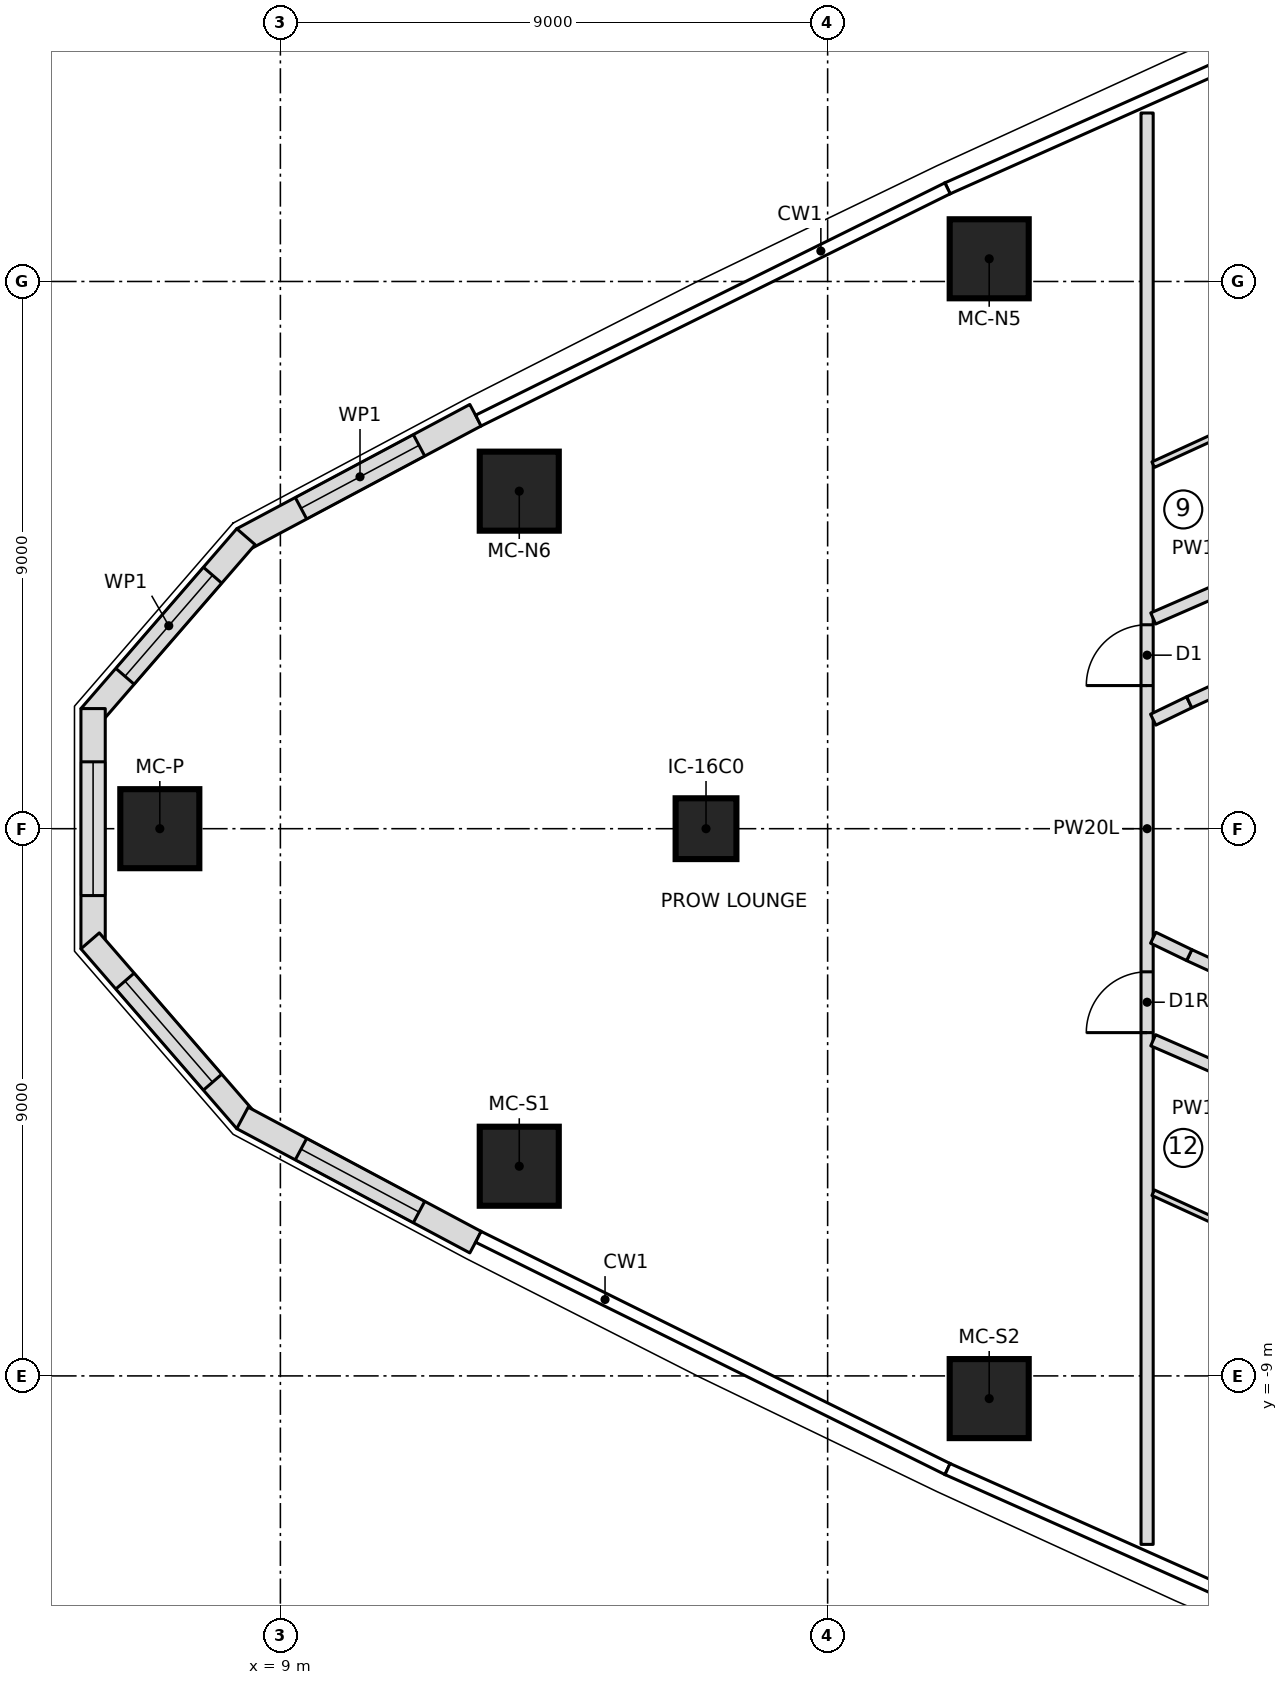
"""IFC4 building model, lengths in metres.
Left out: names, types, materials, properties, quantities, classifications, styles, units other than length and angle.
Written with IfcOpenShell. Run it as: python <this file> out.ifc"""

import sys

from ifc_helpers import new_model, si_unit, direction, frame, frame_2d, origin, origin_2d, place, context, subcontext, project, spatial, polyline, rectangle, outline, extrude, element, fill, save


model = new_model("IFC4")
c1 = context("Model", 3, precision=1e-05, world=origin(), true_north=direction((0.0, 1.0)))
c2 = subcontext(c1, "Body", "Model", "MODEL_VIEW")
j1 = project(units=[si_unit("LENGTHUNIT", "METRE"), si_unit("PLANEANGLEUNIT", "RADIAN")], contexts=[c1])
p1 = place(None, origin())
s1 = spatial("IfcSite", under=j1, at=p1, CompositionType="ELEMENT")
p2 = place(p1, origin())
s2 = spatial("IfcBuilding", under=s1, at=p2, CompositionType="ELEMENT")
p3 = place(p2, frame((0.0, 0.0, 186.15)))
s3 = spatial("IfcBuildingStorey", under=s2, at=p3, CompositionType="ELEMENT", Elevation=186.15)
for number, where, z_axis, x_axis in (
    (1, (7.017, 0.0, 0.0), (0.0, 0.0, 1.0), (1.0, 0.0, 0.0)),
    (2, (12.929, -5.552, 0.0), (0.0, 0.0, 1.0), (1.0, 0.0, 0.0)),
    (3, (20.657, -9.373, 0.0), (0.0, 0.0, 1.0), (1.0, 0.0, 0.0)),
    (4, (20.657, 9.373, 0.0), (0.0, 0.0, 1.0), (1.0, 0.0, 0.0)),
    (5, (12.929, 5.552, 0.0), (0.0, 0.0, 1.0), (1.0, 0.0, 0.0)),
):
    element("IfcColumn", number, at=place(p3, frame(where, z_axis=z_axis, x_axis=x_axis)), inside=s3, PredefinedType="COLUMN", context=c2, shape_type="SweptSolid", body=[
        extrude(rectangle(XDim=1.3, YDim=1.3, at=origin_2d()), origin(), (0.0, 0.0, 1.0), 3.55),
    ])
p4 = place(p3, frame((16.0, 0.0, 0.0), z_axis=(0.0, 0.0, 1.0), x_axis=(1.0, 0.0, 0.0)))
e6 = element("IfcColumn", 6, at=p4, inside=s3, PredefinedType="COLUMN", context=c2, shape_type="SweptSolid", body=[
    extrude(rectangle(XDim=1.0, YDim=1.0, at=origin_2d()), origin(), (0.0, 0.0, 1.0), 3.55),
])
p5 = place(p3, frame((12.21, 6.801, 0.0), z_axis=(0.0, 0.0, 1.0), x_axis=(-0.882385889746, -0.470526451518, 0.0)))
e7 = element("IfcWall", 7, at=p5, inside=s3, PredefinedType="NOTDEFINED", context=c2, shape_type="SweptSolid", body=[
    extrude(outline(polyline([(0.0, -0.2), (4.344, -0.2), (4.27, 0.2), (0.0, 0.2), (0.0, -0.2)])), origin(), (0.0, 0.0, 1.0), 3.25),
])
p6 = place(p5, frame((1.053, 0.0, 0.6)))
e8 = element("IfcOpeningElement", 8, at=p6, cuts=e7, PredefinedType="OPENING", context=c2, shape_type="SweptSolid", body=[
    extrude(outline(polyline([(0.0, 1.35), (0.084, 1.771), (0.322, 2.128), (0.679, 2.366), (1.1, 2.45), (1.521, 2.366), (1.878, 2.128), (2.116, 1.771), (2.2, 1.35), (2.2, 1.1), (2.116, 0.679), (1.878, 0.322), (1.521, 0.084), (1.1, 0.0), (0.679, 0.084), (0.322, 0.322), (0.084, 0.679), (0.0, 1.1), (0.0, 1.35)])), frame((0.0, 0.21, 0.0), z_axis=(0.0, -1.0, 0.0), x_axis=(1.0, 0.0, 0.0)), (0.0, 0.0, 1.0), 0.42),
])
p7 = place(p3, frame((8.409, 4.774, 0.0), z_axis=(0.0, 0.0, 1.0), x_axis=(-0.654759384203, -0.755837382509, 0.0)))
e9 = element("IfcWall", 9, at=p7, inside=s3, PredefinedType="NOTDEFINED", context=c2, shape_type="SweptSolid", body=[
    extrude(outline(polyline([(-0.037, -0.2), (3.876, -0.2), (3.727, 0.2), (0.037, 0.2), (-0.037, -0.2)])), origin(), (0.0, 0.0, 1.0), 3.25),
])
p8 = place(p7, frame((0.801, 0.0, 0.6)))
e10 = element("IfcOpeningElement", 10, at=p8, cuts=e9, PredefinedType="OPENING", context=c2, shape_type="SweptSolid", body=[
    extrude(outline(polyline([(0.0, 1.35), (0.084, 1.771), (0.322, 2.128), (0.679, 2.366), (1.1, 2.45), (1.521, 2.366), (1.878, 2.128), (2.116, 1.771), (2.2, 1.35), (2.2, 1.1), (2.116, 0.679), (1.878, 0.322), (1.521, 0.084), (1.1, 0.0), (0.679, 0.084), (0.322, 0.322), (0.084, 0.679), (0.0, 1.1), (0.0, 1.35)])), frame((0.0, 0.21, 0.0), z_axis=(0.0, -1.0, 0.0), x_axis=(1.0, 0.0, 0.0)), (0.0, 0.0, 1.0), 0.42),
])
p9 = place(p3, frame((5.92, 1.901, 0.0), z_axis=(0.0, 0.0, 1.0), x_axis=(0.0, -1.0, 0.0)))
e11 = element("IfcWall", 11, at=p9, inside=s3, PredefinedType="NOTDEFINED", context=c2, shape_type="SweptSolid", body=[
    extrude(outline(polyline([(-0.075, -0.2), (3.876, -0.2), (3.727, 0.2), (0.075, 0.2), (-0.075, -0.2)])), origin(), (0.0, 0.0, 1.0), 3.25),
])
p10 = place(p9, frame((0.801, 0.0, 0.6)))
e12 = element("IfcOpeningElement", 12, at=p10, cuts=e11, PredefinedType="OPENING", context=c2, shape_type="SweptSolid", body=[
    extrude(outline(polyline([(0.0, 1.35), (0.084, 1.771), (0.322, 2.128), (0.679, 2.366), (1.1, 2.45), (1.521, 2.366), (1.878, 2.128), (2.116, 1.771), (2.2, 1.35), (2.2, 1.1), (2.116, 0.679), (1.878, 0.322), (1.521, 0.084), (1.1, 0.0), (0.679, 0.084), (0.322, 0.322), (0.084, 0.679), (0.0, 1.1), (0.0, 1.35)])), frame((0.0, 0.21, 0.0), z_axis=(0.0, -1.0, 0.0), x_axis=(1.0, 0.0, 0.0)), (0.0, 0.0, 1.0), 0.42),
])
p11 = place(p3, frame((5.92, -1.901, 0.0), z_axis=(0.0, 0.0, 1.0), x_axis=(0.654759384203, -0.755837382509, 0.0)))
e13 = element("IfcWall", 13, at=p11, inside=s3, PredefinedType="NOTDEFINED", context=c2, shape_type="SweptSolid", body=[
    extrude(outline(polyline([(-0.075, -0.2), (3.839, -0.2), (3.765, 0.2), (0.075, 0.2), (-0.075, -0.2)])), origin(), (0.0, 0.0, 1.0), 3.25),
])
p12 = place(p11, frame((0.801, 0.0, 0.6)))
e14 = element("IfcOpeningElement", 14, at=p12, cuts=e13, PredefinedType="OPENING", context=c2, shape_type="SweptSolid", body=[
    extrude(outline(polyline([(0.0, 1.35), (0.084, 1.771), (0.322, 2.128), (0.679, 2.366), (1.1, 2.45), (1.521, 2.366), (1.878, 2.128), (2.116, 1.771), (2.2, 1.35), (2.2, 1.1), (2.116, 0.679), (1.878, 0.322), (1.521, 0.084), (1.1, 0.0), (0.679, 0.084), (0.322, 0.322), (0.084, 0.679), (0.0, 1.1), (0.0, 1.35)])), frame((0.0, 0.21, 0.0), z_axis=(0.0, -1.0, 0.0), x_axis=(1.0, 0.0, 0.0)), (0.0, 0.0, 1.0), 0.42),
])
p13 = place(p3, frame((8.409, -4.774, 0.0), z_axis=(0.0, 0.0, 1.0), x_axis=(0.882385889746, -0.470526451518, 0.0)))
e15 = element("IfcWall", 15, at=p13, inside=s3, PredefinedType="NOTDEFINED", context=c2, shape_type="SweptSolid", body=[
    extrude(outline(polyline([(-0.037, -0.2), (4.307, -0.2), (4.307, 0.2), (0.037, 0.2), (-0.037, -0.2)])), origin(), (0.0, 0.0, 1.0), 3.25),
])
p14 = place(p13, frame((1.053, 0.0, 0.6)))
e16 = element("IfcOpeningElement", 16, at=p14, cuts=e15, PredefinedType="OPENING", context=c2, shape_type="SweptSolid", body=[
    extrude(outline(polyline([(0.0, 1.35), (0.084, 1.771), (0.322, 2.128), (0.679, 2.366), (1.1, 2.45), (1.521, 2.366), (1.878, 2.128), (2.116, 1.771), (2.2, 1.35), (2.2, 1.1), (2.116, 0.679), (1.878, 0.322), (1.521, 0.084), (1.1, 0.0), (0.679, 0.084), (0.322, 0.322), (0.084, 0.679), (0.0, 1.1), (0.0, 1.35)])), frame((0.0, 0.21, 0.0), z_axis=(0.0, -1.0, 0.0), x_axis=(1.0, 0.0, 0.0)), (0.0, 0.0, 1.0), 0.42),
])
p15 = place(p3, frame((23.254, -11.771, 0.0), z_axis=(0.0, 0.0, 1.0), x_axis=(0.0, 1.0, 0.0)))
e17 = element("IfcWall", 17, at=p15, inside=s3, PredefinedType="PARTITIONING", context=c2, shape_type="SweptSolid", body=[
    extrude(rectangle(XDim=23.542, YDim=0.2, at=frame_2d((11.771, 0.0))), origin(), (0.0, 0.0, 1.0), 3.25),
])
p16 = place(p15, frame((14.125, 0.0, 0.0)))
e18 = element("IfcOpeningElement", 18, at=p16, cuts=e17, PredefinedType="OPENING", context=c2, shape_type="SweptSolid", body=[
    extrude(rectangle(XDim=1.0, YDim=2.1, at=frame_2d((0.5, 1.05))), frame((0.0, 0.11, 0.0), z_axis=(0.0, -1.0, 0.0), x_axis=(1.0, 0.0, 0.0)), (0.0, 0.0, 1.0), 0.22),
])
p17 = place(p15, frame((8.417, 0.0, 0.0)))
e19 = element("IfcOpeningElement", 19, at=p17, cuts=e17, PredefinedType="OPENING", context=c2, shape_type="SweptSolid", body=[
    extrude(rectangle(XDim=1.0, YDim=2.1, at=frame_2d((0.5, 1.05))), frame((0.0, 0.11, 0.0), z_axis=(0.0, -1.0, 0.0), x_axis=(1.0, 0.0, 0.0)), (0.0, 0.0, 1.0), 0.22),
])
p18 = place(p3, frame((23.354, 3.458, 0.0), z_axis=(0.0, 0.0, 1.0), x_axis=(0.916719487908, 0.399531451189, 0.0)))
e20 = element("IfcWall", 20, at=p18, inside=s3, PredefinedType="PARTITIONING", context=c2, shape_type="SweptSolid", body=[
    extrude(rectangle(XDim=11.404, YDim=0.2, at=frame_2d((5.702, 0.0))), origin(), (0.0, 0.0, 1.0), 3.25),
])
p19 = place(p18, frame((3.05, 0.0, 0.0)))
e21 = element("IfcOpeningElement", 21, at=p19, cuts=e20, PredefinedType="OPENING", context=c2, shape_type="SweptSolid", body=[
    extrude(rectangle(XDim=1.0, YDim=2.1, at=frame_2d((0.5, 1.05))), frame((0.0, 0.11, 0.0), z_axis=(0.0, -1.0, 0.0), x_axis=(1.0, 0.0, 0.0)), (0.0, 0.0, 1.0), 0.22),
])
p20 = place(p3, frame((23.354, 5.987, 0.0), z_axis=(0.0, 0.0, 1.0), x_axis=(0.909158902999, 0.416449383597, 0.0)))
e22 = element("IfcWall", 22, at=p20, inside=s3, PredefinedType="PARTITIONING", context=c2, shape_type="SweptSolid", body=[
    extrude(rectangle(XDim=1.556, YDim=0.1, at=frame_2d((0.778, 0.0))), origin(), (0.0, 0.0, 1.0), 3.25),
])
p21 = place(p3, frame((23.354, -3.479, 0.0), z_axis=(0.0, 0.0, 1.0), x_axis=(0.916726746983, -0.399514794926, 0.0)))
e23 = element("IfcWall", 23, at=p21, inside=s3, PredefinedType="PARTITIONING", context=c2, shape_type="SweptSolid", body=[
    extrude(rectangle(XDim=11.396, YDim=0.2, at=frame_2d((5.698, 0.0))), origin(), (0.0, 0.0, 1.0), 3.25),
])
p22 = place(p21, frame((3.05, 0.0, 0.0)))
e24 = element("IfcOpeningElement", 24, at=p22, cuts=e23, PredefinedType="OPENING", context=c2, shape_type="SweptSolid", body=[
    extrude(rectangle(XDim=1.0, YDim=2.1, at=frame_2d((0.5, 1.05))), frame((0.0, 0.11, 0.0), z_axis=(0.0, -1.0, 0.0), x_axis=(1.0, 0.0, 0.0)), (0.0, 0.0, 1.0), 0.22),
])
p23 = place(p3, frame((24.769, -6.635, 0.0), z_axis=(0.0, 0.0, 1.0), x_axis=(-0.909158902999, 0.416449383597, 0.0)))
e25 = element("IfcWall", 25, at=p23, inside=s3, PredefinedType="PARTITIONING", context=c2, shape_type="SweptSolid", body=[
    extrude(rectangle(XDim=1.556, YDim=0.1, at=frame_2d((0.778, 0.0))), origin(), (0.0, 0.0, 1.0), 3.25),
])
p24 = place(p3, frame((27.69, -3.793, 0.0), z_axis=(0.0, 0.0, 1.0), x_axis=(-0.909180834404, 0.416401501382, 0.0)))
e26 = element("IfcWall", 26, at=p24, inside=s3, PredefinedType="PARTITIONING", context=c2, shape_type="SweptSolid", body=[
    extrude(rectangle(XDim=4.117, YDim=0.2, at=frame_2d((2.059, 0.0))), origin(), (0.0, 0.0, 1.0), 3.25),
])
p25 = place(p24, frame((1.559, 0.0, 0.0)))
e27 = element("IfcOpeningElement", 27, at=p25, cuts=e26, PredefinedType="OPENING", context=c2, shape_type="SweptSolid", body=[
    extrude(rectangle(XDim=1.0, YDim=2.1, at=frame_2d((0.5, 1.05))), frame((0.0, 0.11, 0.0), z_axis=(0.0, -1.0, 0.0), x_axis=(1.0, 0.0, 0.0)), (0.0, 0.0, 1.0), 0.22),
])
for number, where, z_axis, x_axis in (
    (28, (23.947, -2.079, 0.0), (0.0, 0.0, 1.0), (-0.901, 0.435, 0.0)),
    (29, (23.354, 1.793, 0.0), (0.0, 0.0, 1.0), (0.901, 0.435, 0.0)),
):
    element("IfcWall", number, at=place(p3, frame(where, z_axis=z_axis, x_axis=x_axis)), inside=s3, PredefinedType="PARTITIONING", context=c2, shape_type="SweptSolid", body=[
        extrude(rectangle(XDim=0.658, YDim=0.2, at=frame_2d((0.329, 0.0))), origin(), (0.0, 0.0, 1.0), 3.25),
    ])
p26 = place(p3, frame((23.947, 2.079, 0.0), z_axis=(0.0, 0.0, 1.0), x_axis=(0.909180834404, 0.416401501382, 0.0)))
e30 = element("IfcWall", 30, at=p26, inside=s3, PredefinedType="PARTITIONING", context=c2, shape_type="SweptSolid", body=[
    extrude(rectangle(XDim=4.117, YDim=0.2, at=frame_2d((2.059, 0.0))), origin(), (0.0, 0.0, 1.0), 3.25),
])
p27 = place(p6, origin())
e31 = element("IfcWindow", 31, at=p27, inside=s3, PartitioningType="SINGLE_PANEL", PredefinedType="WINDOW", context=c2, shape_type="SweptSolid", body=[
    extrude(outline(polyline([(0.0, 1.35), (0.084, 1.771), (0.322, 2.128), (0.679, 2.366), (1.1, 2.45), (1.521, 2.366), (1.878, 2.128), (2.116, 1.771), (2.2, 1.35), (2.2, 1.1), (2.116, 0.679), (1.878, 0.322), (1.521, 0.084), (1.1, 0.0), (0.679, 0.084), (0.322, 0.322), (0.084, 0.679), (0.0, 1.1), (0.0, 1.35)])), frame((0.0, 0.17, 0.0), z_axis=(0.0, -1.0, 0.0), x_axis=(1.0, 0.0, 0.0)), (0.0, 0.0, 1.0), 0.06),
])
fill(e8, e31)
p28 = place(p8, origin())
e32 = element("IfcWindow", 32, at=p28, inside=s3, PartitioningType="SINGLE_PANEL", PredefinedType="WINDOW", context=c2, shape_type="SweptSolid", body=[
    extrude(outline(polyline([(0.0, 1.35), (0.084, 1.771), (0.322, 2.128), (0.679, 2.366), (1.1, 2.45), (1.521, 2.366), (1.878, 2.128), (2.116, 1.771), (2.2, 1.35), (2.2, 1.1), (2.116, 0.679), (1.878, 0.322), (1.521, 0.084), (1.1, 0.0), (0.679, 0.084), (0.322, 0.322), (0.084, 0.679), (0.0, 1.1), (0.0, 1.35)])), frame((0.0, 0.17, 0.0), z_axis=(0.0, -1.0, 0.0), x_axis=(1.0, 0.0, 0.0)), (0.0, 0.0, 1.0), 0.06),
])
fill(e10, e32)
p29 = place(p10, origin())
e33 = element("IfcWindow", 33, at=p29, inside=s3, PartitioningType="SINGLE_PANEL", PredefinedType="WINDOW", context=c2, shape_type="SweptSolid", body=[
    extrude(outline(polyline([(0.0, 1.35), (0.084, 1.771), (0.322, 2.128), (0.679, 2.366), (1.1, 2.45), (1.521, 2.366), (1.878, 2.128), (2.116, 1.771), (2.2, 1.35), (2.2, 1.1), (2.116, 0.679), (1.878, 0.322), (1.521, 0.084), (1.1, 0.0), (0.679, 0.084), (0.322, 0.322), (0.084, 0.679), (0.0, 1.1), (0.0, 1.35)])), frame((0.0, 0.17, 0.0), z_axis=(0.0, -1.0, 0.0), x_axis=(1.0, 0.0, 0.0)), (0.0, 0.0, 1.0), 0.06),
])
fill(e12, e33)
p30 = place(p12, origin())
e34 = element("IfcWindow", 34, at=p30, inside=s3, PartitioningType="SINGLE_PANEL", PredefinedType="WINDOW", context=c2, shape_type="SweptSolid", body=[
    extrude(outline(polyline([(0.0, 1.35), (0.084, 1.771), (0.322, 2.128), (0.679, 2.366), (1.1, 2.45), (1.521, 2.366), (1.878, 2.128), (2.116, 1.771), (2.2, 1.35), (2.2, 1.1), (2.116, 0.679), (1.878, 0.322), (1.521, 0.084), (1.1, 0.0), (0.679, 0.084), (0.322, 0.322), (0.084, 0.679), (0.0, 1.1), (0.0, 1.35)])), frame((0.0, 0.17, 0.0), z_axis=(0.0, -1.0, 0.0), x_axis=(1.0, 0.0, 0.0)), (0.0, 0.0, 1.0), 0.06),
])
fill(e14, e34)
p31 = place(p14, origin())
e35 = element("IfcWindow", 35, at=p31, inside=s3, PartitioningType="SINGLE_PANEL", PredefinedType="WINDOW", context=c2, shape_type="SweptSolid", body=[
    extrude(outline(polyline([(0.0, 1.35), (0.084, 1.771), (0.322, 2.128), (0.679, 2.366), (1.1, 2.45), (1.521, 2.366), (1.878, 2.128), (2.116, 1.771), (2.2, 1.35), (2.2, 1.1), (2.116, 0.679), (1.878, 0.322), (1.521, 0.084), (1.1, 0.0), (0.679, 0.084), (0.322, 0.322), (0.084, 0.679), (0.0, 1.1), (0.0, 1.35)])), frame((0.0, 0.17, 0.0), z_axis=(0.0, -1.0, 0.0), x_axis=(1.0, 0.0, 0.0)), (0.0, 0.0, 1.0), 0.06),
])
fill(e16, e35)
p32 = place(p16, origin())
e36 = element("IfcDoor", 36, at=p32, inside=s3, OperationType="SINGLE_SWING_LEFT", PredefinedType="DOOR", context=c2, shape_type="SweptSolid", body=[
    extrude(rectangle(XDim=1.0, YDim=2.1, at=frame_2d((0.5, 1.05))), frame((0.0, 0.025, 0.0), z_axis=(0.0, -1.0, 0.0), x_axis=(1.0, 0.0, 0.0)), (0.0, 0.0, 1.0), 0.05),
])
fill(e18, e36)
p33 = place(p17, origin())
e37 = element("IfcDoor", 37, at=p33, inside=s3, OperationType="SINGLE_SWING_RIGHT", PredefinedType="DOOR", context=c2, shape_type="SweptSolid", body=[
    extrude(rectangle(XDim=1.0, YDim=2.1, at=frame_2d((0.5, 1.05))), frame((0.0, 0.025, 0.0), z_axis=(0.0, -1.0, 0.0), x_axis=(1.0, 0.0, 0.0)), (0.0, 0.0, 1.0), 0.05),
])
fill(e19, e37)
save(model, sys.argv[1])
